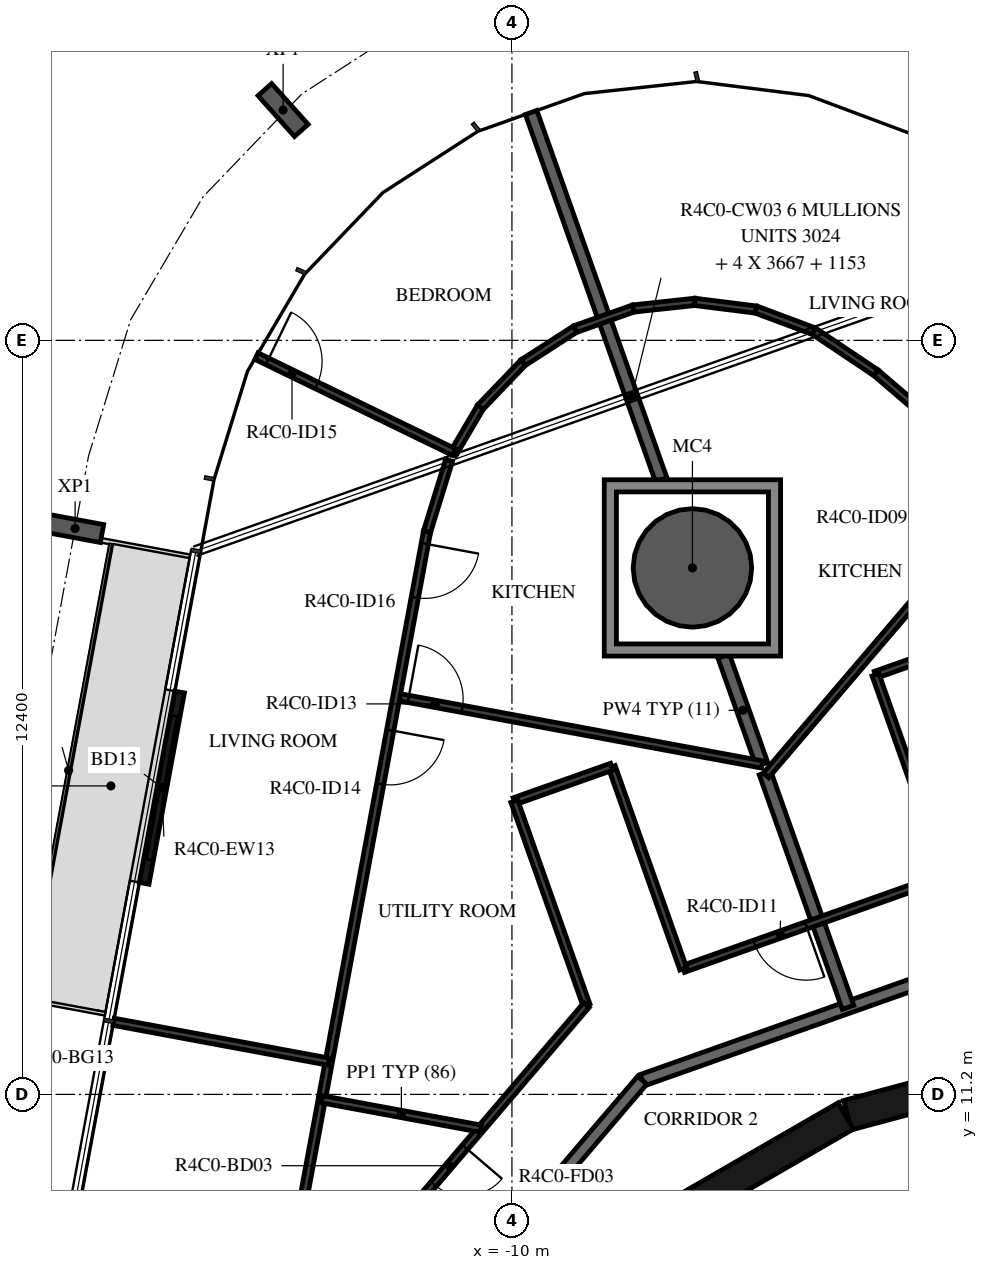
"""IFC4 building model, lengths in metres.
Left out: names, types, materials, properties, quantities, classifications, styles, units other than length and angle.
Written with IfcOpenShell. Run it as: python <this file> out.ifc"""

import sys

from ifc_helpers import new_model, si_unit, direction, frame, frame_2d, origin, origin_2d, place, context, subcontext, project, spatial, polyline, rectangle, hollow_circle, i_section, outline, extrude, element, fill, save


model = new_model("IFC4")
c1 = context("Model", 3, precision=1e-05, world=origin(), true_north=direction((0.0, 1.0)))
c2 = subcontext(c1, "Body", "Model", "MODEL_VIEW")
j1 = project(units=[si_unit("LENGTHUNIT", "METRE"), si_unit("PLANEANGLEUNIT", "RADIAN")], contexts=[c1])
p1 = place(None, origin())
s1 = spatial("IfcSite", under=j1, at=p1, CompositionType="ELEMENT")
p2 = place(p1, origin())
s2 = spatial("IfcBuilding", under=s1, at=p2, CompositionType="ELEMENT")
p3 = place(p2, frame((0.0, 0.0, 179.7)))
s3 = spatial("IfcBuildingStorey", under=s2, at=p3, CompositionType="ELEMENT", Elevation=179.7)
p4 = place(p3, frame((-7.032, 19.858, -0.38), z_axis=(0.0, 0.0, 1.0), x_axis=(1.0, 0.0, 0.0)))
e1 = element("IfcColumn", 1, at=p4, inside=s3, PredefinedType="COLUMN", context=c2, shape_type="SweptSolid", body=[
    extrude(hollow_circle(Radius=0.975, WallThickness=0.045, at=origin_2d()), origin(), (0.0, 0.0, 1.0), 2.576),
])
for number, where, z_axis, x_axis in (
    (2, (-13.763, 27.387, -0.38), (0.0, 0.0, 1.0), (0.746, 0.666, 0.0)),
    (3, (-17.184, 20.505, -0.38), (0.0, 0.0, 1.0), (0.182, 0.983, 0.0)),
):
    element("IfcColumn", number, at=place(p3, frame(where, z_axis=z_axis, x_axis=x_axis)), inside=s3, PredefinedType="COLUMN", context=c2, shape_type="SweptSolid", body=[
        extrude(i_section(OverallWidth=0.3, OverallDepth=0.9, WebThickness=0.019, FlangeThickness=0.035, FilletRadius=0.03, at=origin_2d()), origin(), (0.0, 0.0, 1.0), 2.616),
    ])
p5 = place(p3, frame((-15.465, 17.817, 0.0), z_axis=(0.0, 0.0, 1.0), x_axis=(-0.182201278434, -0.983261254264, 0.0)))
e4 = element("IfcWall", 4, at=p5, inside=s3, PredefinedType="STANDARD", context=c2, shape_type="SweptSolid", body=[
    extrude(rectangle(XDim=3.2, YDim=0.16, at=frame_2d((1.6, 0.0))), origin(), (0.0, 0.0, 1.0), 3.05),
])
p6 = place(p5, frame((0.4, 0.0, 0.0)))
e5 = element("IfcOpeningElement", 5, at=p6, cuts=e4, PredefinedType="OPENING", context=c2, shape_type="SweptSolid", body=[
    extrude(rectangle(XDim=2.4, YDim=2.4, at=frame_2d((1.2, 1.2))), frame((0.0, 0.09, 0.0), z_axis=(0.0, -1.0, 0.0), x_axis=(1.0, 0.0, 0.0)), (0.0, 0.0, 1.0), 0.18),
])
for number, where, z_axis, x_axis in (
    (6, (-1.55, 11.643, 0.0), (0.0, 0.0, 1.0), (-0.966, -0.259, 0.0)),
    (7, (-4.51, 10.845, 0.0), (0.0, 0.0, 1.0), (-0.866, -0.5, 0.0)),
):
    element("IfcWall", number, at=place(p3, frame(where, z_axis=z_axis, x_axis=x_axis)), inside=s3, PredefinedType="SHEAR", context=c2, shape_type="SweptSolid", body=[
        extrude(rectangle(XDim=3.033, YDim=0.5, at=frame_2d((1.516, 0.0))), origin(), (0.0, 0.0, 1.0), 3.05),
    ])
p7 = place(p3, frame((-2.359, 13.38, 0.0), z_axis=(0.0, 0.0, 1.0), x_axis=(-0.942647529236, -0.333789807551, 0.0)))
e8 = element("IfcWall", 8, at=p7, inside=s3, PredefinedType="STANDARD", context=c2, shape_type="SweptSolid", body=[
    extrude(rectangle(XDim=5.833, YDim=0.2, at=frame_2d((2.917, 0.0))), origin(), (0.0, 0.0, 1.0), 3.05),
])
p8 = place(p3, frame((-7.858, 11.433, 0.0), z_axis=(0.0, 0.0, 1.0), x_axis=(-0.649440801937, -0.760412154545, 0.0)))
e9 = element("IfcWall", 9, at=p8, inside=s3, PredefinedType="STANDARD", context=c2, shape_type="SweptSolid", body=[
    extrude(rectangle(XDim=7.181, YDim=0.2, at=frame_2d((3.59, 0.0))), origin(), (0.0, 0.0, 1.0), 3.05),
])
p9 = place(p8, frame((2.6, 0.0, 0.0)))
e10 = element("IfcOpeningElement", 10, at=p9, cuts=e9, PredefinedType="OPENING", context=c2, shape_type="SweptSolid", body=[
    extrude(rectangle(XDim=1.0, YDim=2.1, at=frame_2d((0.5, 1.05))), frame((0.0, 0.11, 0.0), z_axis=(0.0, -1.0, 0.0), x_axis=(1.0, 0.0, 0.0)), (0.0, 0.0, 1.0), 0.22),
])
p10 = place(p3, frame((-5.839, 16.488, 0.0), z_axis=(0.0, 0.0, 1.0), x_axis=(0.333840515054, -0.942629572265, 0.0)))
e11 = element("IfcWall", 11, at=p10, inside=s3, PredefinedType="STANDARD", context=c2, shape_type="SweptSolid", body=[
    extrude(rectangle(XDim=4.092, YDim=0.2, at=frame_2d((2.046, 0.0))), origin(), (0.0, 0.0, 1.0), 3.05),
])
p11 = place(p3, frame((-9.684, 27.348, 0.0), z_axis=(0.0, 0.0, 1.0), x_axis=(0.333810465454, -0.942640214055, 0.0)))
e12 = element("IfcWall", 12, at=p11, inside=s3, PredefinedType="STANDARD", context=c2, shape_type="SweptSolid", body=[
    extrude(rectangle(XDim=6.407, YDim=0.2, at=frame_2d((3.204, 0.0))), origin(), (0.0, 0.0, 1.0), 3.05),
])
p12 = place(p3, frame((-6.518, 18.408, 0.0), z_axis=(0.0, 0.0, 1.0), x_axis=(0.333725210903, -0.942670400303, 0.0)))
e13 = element("IfcWall", 13, at=p12, inside=s3, PredefinedType="STANDARD", context=c2, shape_type="SweptSolid", body=[
    extrude(rectangle(XDim=1.89, YDim=0.2, at=frame_2d((0.945, 0.0))), origin(), (0.0, 0.0, 1.0), 3.05),
])
p13 = place(p3, frame((8.702, 12.206, 0.0), z_axis=(0.0, 0.0, 1.0), x_axis=(-0.760401313718, 0.649453494945, 0.0)))
e14 = element("IfcWall", 14, at=p13, inside=s3, PredefinedType="PARTITIONING", context=c2, shape_type="SweptSolid", body=[
    extrude(rectangle(XDim=16.724, YDim=0.12, at=frame_2d((8.362, 0.0))), origin(), (0.0, 0.0, 1.0), 3.05),
])
p14 = place(p13, frame((0.2, 0.0, 0.0)))
e15 = element("IfcOpeningElement", 15, at=p14, cuts=e14, PredefinedType="OPENING", context=c2, shape_type="SweptSolid", body=[
    extrude(rectangle(XDim=0.9, YDim=2.1, at=frame_2d((0.45, 1.05))), frame((0.0, 0.07, 0.0), z_axis=(0.0, -1.0, 0.0), x_axis=(1.0, 0.0, 0.0)), (0.0, 0.0, 1.0), 0.14),
])
p15 = place(p13, frame((8.02, 0.0, 0.0)))
e16 = element("IfcOpeningElement", 16, at=p15, cuts=e14, PredefinedType="OPENING", context=c2, shape_type="SweptSolid", body=[
    extrude(rectangle(XDim=0.9, YDim=2.1, at=frame_2d((0.45, 1.05))), frame((0.0, 0.07, 0.0), z_axis=(0.0, -1.0, 0.0), x_axis=(1.0, 0.0, 0.0)), (0.0, 0.0, 1.0), 0.14),
])
p16 = place(p13, frame((14.412, 0.0, 0.0)))
e17 = element("IfcOpeningElement", 17, at=p16, cuts=e14, PredefinedType="OPENING", context=c2, shape_type="SweptSolid", body=[
    extrude(rectangle(XDim=0.9, YDim=2.1, at=frame_2d((0.45, 1.05))), frame((0.0, 0.07, 0.0), z_axis=(0.0, -1.0, 0.0), x_axis=(1.0, 0.0, 0.0)), (0.0, 0.0, 1.0), 0.14),
])
p17 = place(p3, frame((-2.419, 18.668, 0.0), z_axis=(0.0, 0.0, 1.0), x_axis=(-0.942661115325, -0.333751436931, 0.0)))
e18 = element("IfcWall", 18, at=p17, inside=s3, PredefinedType="PARTITIONING", context=c2, shape_type="SweptSolid", body=[
    extrude(rectangle(XDim=1.7, YDim=0.12, at=frame_2d((0.85, 0.0))), origin(), (0.0, 0.0, 1.0), 3.05),
])
p18 = place(p3, frame((-4.021, 18.101, 0.0), z_axis=(0.0, 0.0, 1.0), x_axis=(0.333811035895, -0.942640012048, 0.0)))
e19 = element("IfcWall", 19, at=p18, inside=s3, PredefinedType="PARTITIONING", context=c2, shape_type="SweptSolid", body=[
    extrude(rectangle(XDim=3.505, YDim=0.12, at=frame_2d((1.752, 0.0))), origin(), (0.0, 0.0, 1.0), 3.05),
])
p19 = place(p3, frame((-2.852, 14.797, 0.0), z_axis=(0.0, 0.0, 1.0), x_axis=(-0.942629664375, -0.333840254973, 0.0)))
e20 = element("IfcWall", 20, at=p19, inside=s3, PredefinedType="PARTITIONING", context=c2, shape_type="SweptSolid", body=[
    extrude(rectangle(XDim=4.593, YDim=0.12, at=frame_2d((2.297, 0.0))), origin(), (0.0, 0.0, 1.0), 3.05),
])
p20 = place(p19, frame((2.451, 0.0, 0.0)))
e21 = element("IfcOpeningElement", 21, at=p20, cuts=e20, PredefinedType="OPENING", context=c2, shape_type="SweptSolid", body=[
    extrude(rectangle(XDim=0.9, YDim=2.1, at=frame_2d((0.45, 1.05))), frame((0.0, 0.07, 0.0), z_axis=(0.0, -1.0, 0.0), x_axis=(1.0, 0.0, 0.0)), (0.0, 0.0, 1.0), 0.14),
])
p21 = place(p3, frame((-1.79, 21.167, 0.0), z_axis=(0.0, 0.0, 1.0), x_axis=(-0.649456490412, -0.7603987553, 0.0)))
e22 = element("IfcWall", 22, at=p21, inside=s3, PredefinedType="PARTITIONING", context=c2, shape_type="SweptSolid", body=[
    extrude(rectangle(XDim=6.21, YDim=0.12, at=frame_2d((3.105, 0.0))), origin(), (0.0, 0.0, 1.0), 3.05),
])
p22 = place(p21, frame((0.2, 0.0, 0.0)))
e23 = element("IfcOpeningElement", 23, at=p22, cuts=e22, PredefinedType="OPENING", context=c2, shape_type="SweptSolid", body=[
    extrude(rectangle(XDim=0.9, YDim=2.1, at=frame_2d((0.45, 1.05))), frame((0.0, 0.07, 0.0), z_axis=(0.0, -1.0, 0.0), x_axis=(1.0, 0.0, 0.0)), (0.0, 0.0, 1.0), 0.14),
])
p23 = place(p3, frame((-8.961, 23.785, 0.0), z_axis=(0.0, 0.0, 1.0), x_axis=(0.942630376568, 0.333838244022, 0.0)))
e24 = element("IfcWall", 24, at=p23, inside=s3, PredefinedType="PARTITIONING", context=c2, shape_type="SweptSolid", body=[
    extrude(rectangle(XDim=1.016, YDim=0.12, at=frame_2d((0.508, 0.0))), origin(), (0.0, 0.0, 1.0), 3.05),
])
p24 = place(p3, frame((-8.004, 24.124, 0.0), z_axis=(0.0, 0.0, 1.0), x_axis=(0.994216064839, 0.107398400431, 0.0)))
e25 = element("IfcWall", 25, at=p24, inside=s3, PredefinedType="PARTITIONING", context=c2, shape_type="SweptSolid", body=[
    extrude(rectangle(XDim=1.016, YDim=0.12, at=frame_2d((0.508, 0.0))), origin(), (0.0, 0.0, 1.0), 3.05),
])
p25 = place(p3, frame((-6.994, 24.233, 0.0), z_axis=(0.0, 0.0, 1.0), x_axis=(0.992188875952, -0.124744676991, 0.0)))
e26 = element("IfcWall", 26, at=p25, inside=s3, PredefinedType="PARTITIONING", context=c2, shape_type="SweptSolid", body=[
    extrude(rectangle(XDim=1.016, YDim=0.12, at=frame_2d((0.508, 0.0))), origin(), (0.0, 0.0, 1.0), 3.05),
])
p26 = place(p3, frame((-5.986, 24.106, 0.0), z_axis=(0.0, 0.0, 1.0), x_axis=(0.936625084254, -0.350333343469, 0.0)))
e27 = element("IfcWall", 27, at=p26, inside=s3, PredefinedType="PARTITIONING", context=c2, shape_type="SweptSolid", body=[
    extrude(rectangle(XDim=1.016, YDim=0.12, at=frame_2d((0.508, 0.0))), origin(), (0.0, 0.0, 1.0), 3.05),
])
p27 = place(p3, frame((-5.034, 23.75, 0.0), z_axis=(0.0, 0.0, 1.0), x_axis=(0.83070096574, -0.556718874764, 0.0)))
e28 = element("IfcWall", 28, at=p27, inside=s3, PredefinedType="PARTITIONING", context=c2, shape_type="SweptSolid", body=[
    extrude(rectangle(XDim=1.227, YDim=0.12, at=frame_2d((0.614, 0.0))), origin(), (0.0, 0.0, 1.0), 3.05),
])
p28 = place(p3, frame((-7.181, 13.263, 0.0), z_axis=(0.0, 0.0, 1.0), x_axis=(-0.333822798183, 0.942635846663, 0.0)))
e29 = element("IfcWall", 29, at=p28, inside=s3, PredefinedType="PARTITIONING", context=c2, shape_type="SweptSolid", body=[
    extrude(rectangle(XDim=3.527, YDim=0.12, at=frame_2d((1.764, 0.0))), origin(), (0.0, 0.0, 1.0), 3.05),
])
p29 = place(p3, frame((-8.359, 16.588, 0.0), z_axis=(0.0, 0.0, 1.0), x_axis=(-0.942661115325, -0.333751436931, 0.0)))
e30 = element("IfcWall", 30, at=p29, inside=s3, PredefinedType="PARTITIONING", context=c2, shape_type="SweptSolid", body=[
    extrude(rectangle(XDim=1.7, YDim=0.12, at=frame_2d((0.85, 0.0))), origin(), (0.0, 0.0, 1.0), 3.05),
])
p30 = place(p3, frame((-9.961, 16.021, 0.0), z_axis=(0.0, 0.0, 1.0), x_axis=(0.333803930912, -0.94264252806, 0.0)))
e31 = element("IfcWall", 31, at=p30, inside=s3, PredefinedType="PARTITIONING", context=c2, shape_type="SweptSolid", body=[
    extrude(rectangle(XDim=3.556, YDim=0.12, at=frame_2d((1.778, 0.0))), origin(), (0.0, 0.0, 1.0), 3.05),
])
p31 = place(p3, frame((-8.774, 12.669, 0.0), z_axis=(0.0, 0.0, 1.0), x_axis=(-0.649446157105, -0.760407580855, 0.0)))
e32 = element("IfcWall", 32, at=p31, inside=s3, PredefinedType="PARTITIONING", context=c2, shape_type="SweptSolid", body=[
    extrude(rectangle(XDim=7.927, YDim=0.12, at=frame_2d((3.964, 0.0))), origin(), (0.0, 0.0, 1.0), 3.05),
])
p32 = place(p31, frame((3.074, 0.0, 0.0)))
e33 = element("IfcOpeningElement", 33, at=p32, cuts=e32, PredefinedType="OPENING", context=c2, shape_type="SweptSolid", body=[
    extrude(rectangle(XDim=0.8, YDim=2.1, at=frame_2d((0.4, 1.05))), frame((0.0, 0.07, 0.0), z_axis=(0.0, -1.0, 0.0), x_axis=(1.0, 0.0, 0.0)), (0.0, 0.0, 1.0), 0.14),
])
p33 = place(p3, frame((-13.955, 6.647, 0.0), z_axis=(0.0, 0.0, 1.0), x_axis=(0.182264522222, 0.983249532896, 0.0)))
e34 = element("IfcWall", 34, at=p33, inside=s3, PredefinedType="PARTITIONING", context=c2, shape_type="SweptSolid", body=[
    extrude(rectangle(XDim=4.589, YDim=0.12, at=frame_2d((2.294, 0.0))), origin(), (0.0, 0.0, 1.0), 3.05),
])
p34 = place(p3, frame((-10.974, 21.728, 0.0), z_axis=(0.0, 0.0, 1.0), x_axis=(0.507353148194, 0.861738233466, 0.0)))
e35 = element("IfcWall", 35, at=p34, inside=s3, PredefinedType="PARTITIONING", context=c2, shape_type="SweptSolid", body=[
    extrude(rectangle(XDim=0.897, YDim=0.12, at=frame_2d((0.448, 0.0))), origin(), (0.0, 0.0, 1.0), 3.05),
])
p35 = place(p3, frame((-10.519, 22.501, 0.0), z_axis=(0.0, 0.0, 1.0), x_axis=(0.69266189308, 0.721262436201, 0.0)))
e36 = element("IfcWall", 36, at=p35, inside=s3, PredefinedType="PARTITIONING", context=c2, shape_type="SweptSolid", body=[
    extrude(rectangle(XDim=1.016, YDim=0.12, at=frame_2d((0.508, 0.0))), origin(), (0.0, 0.0, 1.0), 3.05),
])
p36 = place(p3, frame((-9.815, 23.234, 0.0), z_axis=(0.0, 0.0, 1.0), x_axis=(0.840310772539, 0.542104976508, 0.0)))
e37 = element("IfcWall", 37, at=p36, inside=s3, PredefinedType="PARTITIONING", context=c2, shape_type="SweptSolid", body=[
    extrude(rectangle(XDim=1.016, YDim=0.12, at=frame_2d((0.508, 0.0))), origin(), (0.0, 0.0, 1.0), 3.05),
])
p37 = place(p3, frame((-14.202, 23.341, 0.0), z_axis=(0.0, 0.0, 1.0), x_axis=(0.899466404534, -0.436989916491, 0.0)))
e38 = element("IfcWall", 38, at=p37, inside=s3, PredefinedType="PARTITIONING", context=c2, shape_type="SweptSolid", body=[
    extrude(rectangle(XDim=3.611, YDim=0.12, at=frame_2d((1.806, 0.0))), origin(), (0.0, 0.0, 1.0), 3.05),
])
p38 = place(p37, frame((0.2, 0.0, 0.0)))
e39 = element("IfcOpeningElement", 39, at=p38, cuts=e38, PredefinedType="OPENING", context=c2, shape_type="SweptSolid", body=[
    extrude(rectangle(XDim=0.9, YDim=2.1, at=frame_2d((0.45, 1.05))), frame((0.0, 0.07, 0.0), z_axis=(0.0, -1.0, 0.0), x_axis=(1.0, 0.0, 0.0)), (0.0, 0.0, 1.0), 0.14),
])
p39 = place(p3, frame((-11.899, 17.74, 0.0), z_axis=(0.0, 0.0, 1.0), x_axis=(0.983254721409, -0.182236529889, 0.0)))
e40 = element("IfcWall", 40, at=p39, inside=s3, PredefinedType="PARTITIONING", context=c2, shape_type="SweptSolid", body=[
    extrude(rectangle(XDim=6.114, YDim=0.12, at=frame_2d((3.057, 0.0))), origin(), (0.0, 0.0, 1.0), 3.05),
])
p40 = place(p39, frame((0.2, 0.0, 0.0)))
e41 = element("IfcOpeningElement", 41, at=p40, cuts=e40, PredefinedType="OPENING", context=c2, shape_type="SweptSolid", body=[
    extrude(rectangle(XDim=0.9, YDim=2.1, at=frame_2d((0.45, 1.05))), frame((0.0, 0.07, 0.0), z_axis=(0.0, -1.0, 0.0), x_axis=(1.0, 0.0, 0.0)), (0.0, 0.0, 1.0), 0.14),
])
p41 = place(p3, frame((-11.034, 21.625, 0.0), z_axis=(0.0, 0.0, 1.0), x_axis=(-0.295260042089, -0.955416928647, 0.0)))
e42 = element("IfcWall", 42, at=p41, inside=s3, PredefinedType="PARTITIONING", context=c2, shape_type="SweptSolid", body=[
    extrude(rectangle(XDim=1.227, YDim=0.12, at=frame_2d((0.614, 0.0))), origin(), (0.0, 0.0, 1.0), 3.05),
])
p42 = place(p3, frame((-11.396, 20.453, 0.0), z_axis=(0.0, 0.0, 1.0), x_axis=(-0.182223370439, -0.983257160292, 0.0)))
e43 = element("IfcWall", 43, at=p42, inside=s3, PredefinedType="PARTITIONING", context=c2, shape_type="SweptSolid", body=[
    extrude(rectangle(XDim=9.452, YDim=0.12, at=frame_2d((4.726, 0.0))), origin(), (0.0, 0.0, 1.0), 3.05),
])
p43 = place(p42, frame((3.319, 0.0, 0.0)))
e44 = element("IfcOpeningElement", 44, at=p43, cuts=e43, PredefinedType="OPENING", context=c2, shape_type="SweptSolid", body=[
    extrude(rectangle(XDim=0.9, YDim=2.1, at=frame_2d((0.45, 1.05))), frame((0.0, 0.07, 0.0), z_axis=(0.0, -1.0, 0.0), x_axis=(1.0, 0.0, 0.0)), (0.0, 0.0, 1.0), 0.14),
])
p44 = place(p42, frame((0.2, 0.0, 0.0)))
e45 = element("IfcOpeningElement", 45, at=p44, cuts=e43, PredefinedType="OPENING", context=c2, shape_type="SweptSolid", body=[
    extrude(rectangle(XDim=0.9, YDim=2.1, at=frame_2d((0.45, 1.05))), frame((0.0, 0.07, 0.0), z_axis=(0.0, -1.0, 0.0), x_axis=(1.0, 0.0, 0.0)), (0.0, 0.0, 1.0), 0.14),
])
p45 = place(p3, frame((-13.126, 11.12, 0.0), z_axis=(0.0, 0.0, 1.0), x_axis=(0.983257646361, -0.182220747645, 0.0)))
e46 = element("IfcWall", 46, at=p45, inside=s3, PredefinedType="PARTITIONING", context=c2, shape_type="SweptSolid", body=[
    extrude(rectangle(XDim=2.659, YDim=0.12, at=frame_2d((1.33, 0.0))), origin(), (0.0, 0.0, 1.0), 3.05),
])
p46 = place(p3, frame((-16.552, 12.394, 0.0), z_axis=(0.0, 0.0, 1.0), x_axis=(0.983257712156, -0.182220392618, 0.0)))
e47 = element("IfcWall", 47, at=p46, inside=s3, PredefinedType="PARTITIONING", context=c2, shape_type="SweptSolid", body=[
    extrude(rectangle(XDim=3.6, YDim=0.12, at=frame_2d((1.8, 0.0))), origin(), (0.0, 0.0, 1.0), 3.05),
])
p47 = place(p3, origin())
e48 = element("IfcWall", 48, at=p47, inside=s3, PredefinedType="STANDARD", context=c2, shape_type="SweptSolid", body=[
    extrude(outline(polyline([(-5.582, 21.308), (-5.582, 18.408), (-8.482, 18.408), (-8.482, 21.308), (-5.582, 21.308)]), holes=[polyline([(-8.282, 18.608), (-5.782, 18.608), (-5.782, 21.108), (-8.282, 21.108), (-8.282, 18.608)])]), origin(), (0.0, 0.0, 1.0), 3.05),
])
p48 = place(p6, origin())
e49 = element("IfcDoor", 49, at=p48, inside=s3, OperationType="DOUBLE_DOOR_SLIDING", PredefinedType="DOOR", context=c2, shape_type="SweptSolid", body=[
    extrude(rectangle(XDim=2.4, YDim=2.4, at=frame_2d((1.2, 1.2))), frame((0.0, 0.025, 0.0), z_axis=(0.0, -1.0, 0.0), x_axis=(1.0, 0.0, 0.0)), (0.0, 0.0, 1.0), 0.05),
])
fill(e5, e49)
p49 = place(p20, origin())
e50 = element("IfcDoor", 50, at=p49, inside=s3, OperationType="SINGLE_SWING_LEFT", PredefinedType="DOOR", context=c2, shape_type="SweptSolid", body=[
    extrude(rectangle(XDim=0.9, YDim=2.1, at=frame_2d((0.45, 1.05))), frame((0.0, 0.025, 0.0), z_axis=(0.0, -1.0, 0.0), x_axis=(1.0, 0.0, 0.0)), (0.0, 0.0, 1.0), 0.05),
])
fill(e21, e50)
p50 = place(p32, origin())
e51 = element("IfcDoor", 51, at=p50, inside=s3, OperationType="SINGLE_SWING_LEFT", PredefinedType="DOOR", context=c2, shape_type="SweptSolid", body=[
    extrude(rectangle(XDim=0.8, YDim=2.1, at=frame_2d((0.4, 1.05))), frame((0.0, 0.025, 0.0), z_axis=(0.0, -1.0, 0.0), x_axis=(1.0, 0.0, 0.0)), (0.0, 0.0, 1.0), 0.05),
])
fill(e33, e51)
p51 = place(p40, origin())
e52 = element("IfcDoor", 52, at=p51, inside=s3, OperationType="SINGLE_SWING_LEFT", PredefinedType="DOOR", context=c2, shape_type="SweptSolid", body=[
    extrude(rectangle(XDim=0.9, YDim=2.1, at=frame_2d((0.45, 1.05))), frame((0.0, 0.025, 0.0), z_axis=(0.0, -1.0, 0.0), x_axis=(1.0, 0.0, 0.0)), (0.0, 0.0, 1.0), 0.05),
])
fill(e41, e52)
p52 = place(p43, origin())
e53 = element("IfcDoor", 53, at=p52, inside=s3, OperationType="SINGLE_SWING_LEFT", PredefinedType="DOOR", context=c2, shape_type="SweptSolid", body=[
    extrude(rectangle(XDim=0.9, YDim=2.1, at=frame_2d((0.45, 1.05))), frame((0.0, 0.025, 0.0), z_axis=(0.0, -1.0, 0.0), x_axis=(1.0, 0.0, 0.0)), (0.0, 0.0, 1.0), 0.05),
])
fill(e44, e53)
p53 = place(p38, origin())
e54 = element("IfcDoor", 54, at=p53, inside=s3, OperationType="SINGLE_SWING_LEFT", PredefinedType="DOOR", context=c2, shape_type="SweptSolid", body=[
    extrude(rectangle(XDim=0.9, YDim=2.1, at=frame_2d((0.45, 1.05))), frame((0.0, 0.025, 0.0), z_axis=(0.0, -1.0, 0.0), x_axis=(1.0, 0.0, 0.0)), (0.0, 0.0, 1.0), 0.05),
])
fill(e39, e54)
p54 = place(p44, origin())
e55 = element("IfcDoor", 55, at=p54, inside=s3, OperationType="SINGLE_SWING_RIGHT", PredefinedType="DOOR", context=c2, shape_type="SweptSolid", body=[
    extrude(rectangle(XDim=0.9, YDim=2.1, at=frame_2d((0.45, 1.05))), frame((0.0, 0.025, 0.0), z_axis=(0.0, -1.0, 0.0), x_axis=(1.0, 0.0, 0.0)), (0.0, 0.0, 1.0), 0.05),
])
fill(e45, e55)
save(model, sys.argv[1])
